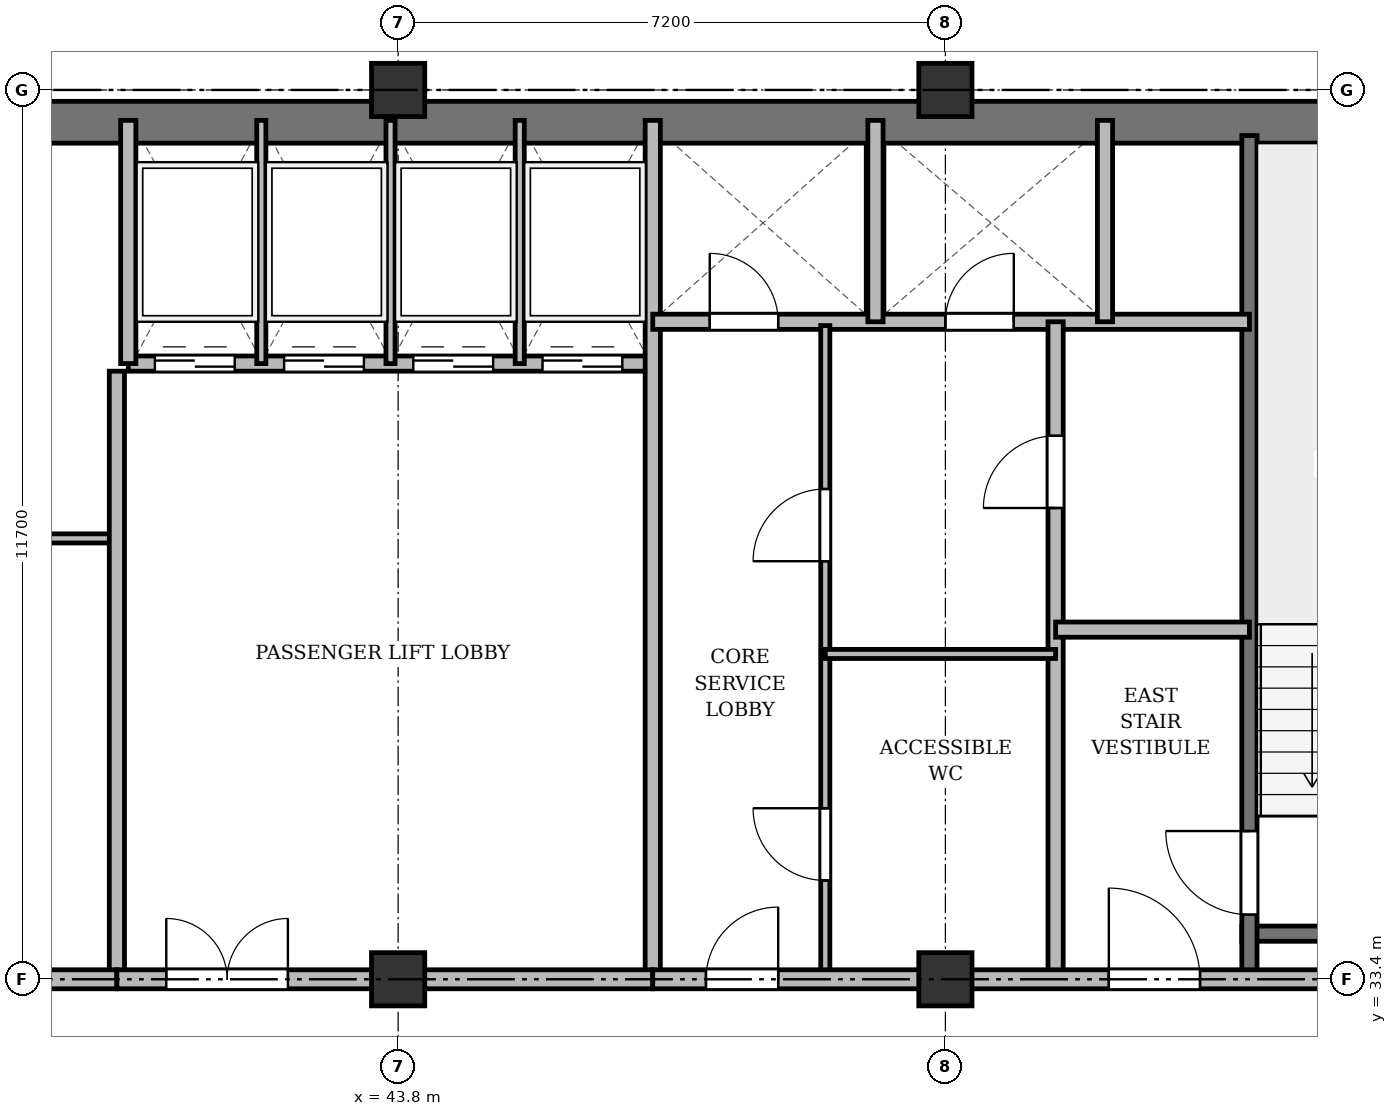
"""IFC4 building model, lengths in metres.
Left out: names, types, materials, properties, quantities, classifications, styles, units other than length and angle.
Written with IfcOpenShell. Run it as: python <this file> out.ifc"""

import sys

from ifc_helpers import new_model, si_unit, direction, frame, frame_2d, origin, origin_2d, place, context, subcontext, project, spatial, rectangle, extrude, source, transform, mapped, element, fill, save


model = new_model("IFC4")
c1 = context("Model", 3, precision=1e-05, world=origin(), true_north=direction((0.0, 1.0)))
c2 = subcontext(c1, "Body", "Model", "MODEL_VIEW")
j1 = project(units=[si_unit("LENGTHUNIT", "METRE"), si_unit("PLANEANGLEUNIT", "RADIAN")], contexts=[c1])
p1 = place(None, origin())
s1 = spatial("IfcSite", under=j1, at=p1, CompositionType="ELEMENT")
p2 = place(p1, origin())
s2 = spatial("IfcBuilding", under=s1, at=p2, CompositionType="ELEMENT")
p3 = place(p2, frame((0.0, 0.0, 230.1)))
s3 = spatial("IfcBuildingStorey", under=s2, at=p3, CompositionType="ELEMENT", Elevation=230.1)
m1 = source(origin(), c2, "Body", "SweptSolid", [
    extrude(rectangle(XDim=0.7, YDim=0.7, at=origin_2d()), origin(), (0.0, 0.0, 1.0), 3.6),
])
for number, where, z_axis, x_axis in (
    (1, (43.8, 33.4, 0.0), (0.0, 0.0, 1.0), (1.0, 0.0, 0.0)),
    (2, (43.8, 45.1, 0.0), (0.0, 0.0, 1.0), (1.0, 0.0, 0.0)),
    (3, (51.0, 33.4, 0.0), (0.0, 0.0, 1.0), (1.0, 0.0, 0.0)),
    (4, (51.0, 45.1, 0.0), (0.0, 0.0, 1.0), (1.0, 0.0, 0.0)),
):
    element("IfcColumn", number, at=place(p3, frame(where, z_axis=z_axis, x_axis=x_axis)), inside=s3, PredefinedType="COLUMN", context=c2, shape_type="MappedRepresentation", body=[
        mapped(m1, transform((0.0, 0.0, 0.0), x_axis=(1.0, 0.0, 0.0), y_axis=(0.0, 1.0, 0.0), z_axis=(0.0, 0.0, 1.0), scale=1.0)),
    ])
p4 = place(p3, frame((15.65, 44.675, 0.0), z_axis=(0.0, 0.0, 1.0), x_axis=(1.0, 0.0, 0.0)))
e5 = element("IfcWall", 5, at=p4, inside=s3, PredefinedType="SHEAR", context=c2, shape_type="SweptSolid", body=[
    extrude(rectangle(XDim=43.1, YDim=0.55, at=frame_2d((21.55, 0.0))), origin(), (0.0, 0.0, 1.0), 3.36),
])
p5 = place(p3, frame((54.9, 34.0, 0.0), z_axis=(0.0, 0.0, 1.0), x_axis=(1.0, 0.0, 0.0)))
e6 = element("IfcWall", 6, at=p5, inside=s3, PredefinedType="SHEAR", context=c2, shape_type="SweptSolid", body=[
    extrude(rectangle(XDim=3.4, YDim=0.2, at=frame_2d((1.7, 0.0))), origin(), (0.0, 0.0, 1.0), 3.36),
])
p6 = place(p3, frame((55.0, 33.4, 0.0), z_axis=(0.0, 0.0, 1.0), x_axis=(0.0, 1.0, 0.0)))
e7 = element("IfcWall", 7, at=p6, inside=s3, PredefinedType="SHEAR", context=c2, shape_type="SweptSolid", body=[
    extrude(rectangle(XDim=11.1, YDim=0.2, at=frame_2d((5.55, 0.0))), origin(), (0.0, 0.0, 1.0), 3.36),
])
p7 = place(p6, frame((0.85, 0.0, 0.0)))
e8 = element("IfcOpeningElement", 8, at=p7, cuts=e7, PredefinedType="OPENING", context=c2, shape_type="SweptSolid", body=[
    extrude(rectangle(XDim=1.1, YDim=2.15, at=frame_2d((0.55, 1.075))), frame((0.0, 0.11, 0.0), z_axis=(0.0, -1.0, 0.0), x_axis=(1.0, 0.0, 0.0)), (0.0, 0.0, 1.0), 0.22),
])
p8 = place(p3, frame((33.3, 39.2, 0.0), z_axis=(0.0, 0.0, 1.0), x_axis=(1.0, 0.0, 0.0)))
e9 = element("IfcWall", 9, at=p8, inside=s3, PredefinedType="PARTITIONING", context=c2, shape_type="SweptSolid", body=[
    extrude(rectangle(XDim=6.8, YDim=0.12, at=frame_2d((3.4, 0.0))), origin(), (0.0, 0.0, 1.0), 3.36),
])
p9 = place(p8, frame((2.6, 0.0, 0.0)))
e10 = element("IfcOpeningElement", 10, at=p9, cuts=e9, PredefinedType="OPENING", context=c2, shape_type="SweptSolid", body=[
    extrude(rectangle(XDim=0.95, YDim=2.15, at=frame_2d((0.475, 1.075))), frame((0.0, 0.07, 0.0), z_axis=(0.0, -1.0, 0.0), x_axis=(1.0, 0.0, 0.0)), (0.0, 0.0, 1.0), 0.14),
])
p10 = place(p3, frame((40.1, 33.4, 0.0), z_axis=(0.0, 0.0, 1.0), x_axis=(0.0, 1.0, 0.0)))
e11 = element("IfcWall", 11, at=p10, inside=s3, PredefinedType="SOLIDWALL", context=c2, shape_type="SweptSolid", body=[
    extrude(rectangle(XDim=8.0, YDim=0.2, at=frame_2d((4.0, 0.0))), origin(), (0.0, 0.0, 1.0), 2.91),
])
p11 = place(p3, frame((40.25, 41.5, 0.0), z_axis=(0.0, 0.0, 1.0), x_axis=(1.0, 0.0, 0.0)))
e12 = element("IfcWall", 12, at=p11, inside=s3, PredefinedType="SOLIDWALL", context=c2, shape_type="SweptSolid", body=[
    extrude(rectangle(XDim=6.9, YDim=0.2, at=frame_2d((3.45, 0.0))), origin(), (0.0, 0.0, 1.0), 3.36),
])
p12 = place(p11, frame((0.35, 0.0, 0.0)))
e13 = element("IfcOpeningElement", 13, at=p12, cuts=e12, PredefinedType="OPENING", context=c2, shape_type="SweptSolid", body=[
    extrude(rectangle(XDim=1.05, YDim=2.15, at=frame_2d((0.525, 1.075))), frame((0.0, 0.11, 0.0), z_axis=(0.0, -1.0, 0.0), x_axis=(1.0, 0.0, 0.0)), (0.0, 0.0, 1.0), 0.22),
])
p13 = place(p11, frame((2.05, 0.0, 0.0)))
e14 = element("IfcOpeningElement", 14, at=p13, cuts=e12, PredefinedType="OPENING", context=c2, shape_type="SweptSolid", body=[
    extrude(rectangle(XDim=1.05, YDim=2.15, at=frame_2d((0.525, 1.075))), frame((0.0, 0.11, 0.0), z_axis=(0.0, -1.0, 0.0), x_axis=(1.0, 0.0, 0.0)), (0.0, 0.0, 1.0), 0.22),
])
p14 = place(p11, frame((3.75, 0.0, 0.0)))
e15 = element("IfcOpeningElement", 15, at=p14, cuts=e12, PredefinedType="OPENING", context=c2, shape_type="SweptSolid", body=[
    extrude(rectangle(XDim=1.05, YDim=2.15, at=frame_2d((0.525, 1.075))), frame((0.0, 0.11, 0.0), z_axis=(0.0, -1.0, 0.0), x_axis=(1.0, 0.0, 0.0)), (0.0, 0.0, 1.0), 0.22),
])
p15 = place(p11, frame((5.45, 0.0, 0.0)))
e16 = element("IfcOpeningElement", 16, at=p15, cuts=e12, PredefinedType="OPENING", context=c2, shape_type="SweptSolid", body=[
    extrude(rectangle(XDim=1.05, YDim=2.15, at=frame_2d((0.525, 1.075))), frame((0.0, 0.11, 0.0), z_axis=(0.0, -1.0, 0.0), x_axis=(1.0, 0.0, 0.0)), (0.0, 0.0, 1.0), 0.22),
])
p16 = place(p3, frame((40.25, 41.5, 0.0), z_axis=(0.0, 0.0, 1.0), x_axis=(0.0, 1.0, 0.0)))
e17 = element("IfcWall", 17, at=p16, inside=s3, PredefinedType="SOLIDWALL", context=c2, shape_type="SweptSolid", body=[
    extrude(rectangle(XDim=3.2, YDim=0.2, at=frame_2d((1.6, 0.0))), origin(), (0.0, 0.0, 1.0), 3.36),
])
for number, where, z_axis, x_axis in (
    (18, (42.0, 41.5, 0.0), (0.0, 0.0, 1.0), (0.0, 1.0, 0.0)),
    (19, (43.7, 41.5, 0.0), (0.0, 0.0, 1.0), (0.0, 1.0, 0.0)),
    (20, (45.4, 41.5, 0.0), (0.0, 0.0, 1.0), (0.0, 1.0, 0.0)),
):
    element("IfcWall", number, at=place(p3, frame(where, z_axis=z_axis, x_axis=x_axis)), inside=s3, PredefinedType="PARTITIONING", context=c2, shape_type="SweptSolid", body=[
        extrude(rectangle(XDim=3.2, YDim=0.12, at=frame_2d((1.6, 0.0))), origin(), (0.0, 0.0, 1.0), 3.36),
    ])
p17 = place(p3, frame((47.15, 33.4, 0.0), z_axis=(0.0, 0.0, 1.0), x_axis=(0.0, 1.0, 0.0)))
e21 = element("IfcWall", 21, at=p17, inside=s3, PredefinedType="SOLIDWALL", context=c2, shape_type="SweptSolid", body=[
    extrude(rectangle(XDim=11.3, YDim=0.2, at=frame_2d((5.65, 0.0))), origin(), (0.0, 0.0, 1.0), 2.91),
])
p18 = place(p3, frame((33.3, 33.4, 0.0), z_axis=(0.0, 0.0, 1.0), x_axis=(1.0, 0.0, 0.0)))
e22 = element("IfcWall", 22, at=p18, inside=s3, PredefinedType="PARTITIONING", context=c2, shape_type="SweptSolid", body=[
    extrude(rectangle(XDim=6.8, YDim=0.25, at=frame_2d((3.4, 0.0))), origin(), (0.0, 0.0, 1.0), 2.91),
])
p19 = place(p18, frame((2.4, 0.0, 0.0)))
e23 = element("IfcOpeningElement", 23, at=p19, cuts=e22, PredefinedType="OPENING", context=c2, shape_type="SweptSolid", body=[
    extrude(rectangle(XDim=1.0, YDim=2.15, at=frame_2d((0.5, 1.075))), frame((0.0, 0.135, 0.0), z_axis=(0.0, -1.0, 0.0), x_axis=(1.0, 0.0, 0.0)), (0.0, 0.0, 1.0), 0.27),
])
p20 = place(p3, frame((40.1, 33.4, 0.0), z_axis=(0.0, 0.0, 1.0), x_axis=(1.0, 0.0, 0.0)))
e24 = element("IfcWall", 24, at=p20, inside=s3, PredefinedType="PARTITIONING", context=c2, shape_type="SweptSolid", body=[
    extrude(rectangle(XDim=7.05, YDim=0.25, at=frame_2d((3.525, 0.0))), origin(), (0.0, 0.0, 1.0), 2.91),
])
p21 = place(p20, frame((0.65, 0.0, 0.0)))
e25 = element("IfcOpeningElement", 25, at=p21, cuts=e24, PredefinedType="OPENING", context=c2, shape_type="SweptSolid", body=[
    extrude(rectangle(XDim=1.6, YDim=2.2, at=frame_2d((0.8, 1.1))), frame((0.0, 0.135, 0.0), z_axis=(0.0, -1.0, 0.0), x_axis=(1.0, 0.0, 0.0)), (0.0, 0.0, 1.0), 0.27),
])
p22 = place(p3, frame((47.15, 42.05, 0.0), z_axis=(0.0, 0.0, 1.0), x_axis=(1.0, 0.0, 0.0)))
e26 = element("IfcWall", 26, at=p22, inside=s3, PredefinedType="SOLIDWALL", context=c2, shape_type="SweptSolid", body=[
    extrude(rectangle(XDim=7.85, YDim=0.2, at=frame_2d((3.925, 0.0))), origin(), (0.0, 0.0, 1.0), 2.86),
])
p23 = place(p22, frame((0.75, 0.0, 0.0)))
e27 = element("IfcOpeningElement", 27, at=p23, cuts=e26, PredefinedType="OPENING", context=c2, shape_type="SweptSolid", body=[
    extrude(rectangle(XDim=0.9, YDim=2.1, at=frame_2d((0.45, 1.05))), frame((0.0, 0.11, 0.0), z_axis=(0.0, -1.0, 0.0), x_axis=(1.0, 0.0, 0.0)), (0.0, 0.0, 1.0), 0.22),
])
p24 = place(p22, frame((3.85, 0.0, 0.0)))
e28 = element("IfcOpeningElement", 28, at=p24, cuts=e26, PredefinedType="OPENING", context=c2, shape_type="SweptSolid", body=[
    extrude(rectangle(XDim=0.9, YDim=2.1, at=frame_2d((0.45, 1.05))), frame((0.0, 0.11, 0.0), z_axis=(0.0, -1.0, 0.0), x_axis=(1.0, 0.0, 0.0)), (0.0, 0.0, 1.0), 0.22),
])
for number, where, z_axis, x_axis in (
    (29, (50.08, 42.05, 0.0), (0.0, 0.0, 1.0), (0.0, 1.0, 0.0)),
    (30, (53.1, 42.05, 0.0), (0.0, 0.0, 1.0), (0.0, 1.0, 0.0)),
):
    element("IfcWall", number, at=place(p3, frame(where, z_axis=z_axis, x_axis=x_axis)), inside=s3, PredefinedType="SOLIDWALL", context=c2, shape_type="SweptSolid", body=[
        extrude(rectangle(XDim=2.65, YDim=0.2, at=frame_2d((1.325, 0.0))), origin(), (0.0, 0.0, 1.0), 3.36),
    ])
p25 = place(p3, frame((52.45, 33.4, 0.0), z_axis=(0.0, 0.0, 1.0), x_axis=(0.0, 1.0, 0.0)))
e31 = element("IfcWall", 31, at=p25, inside=s3, PredefinedType="PARTITIONING", context=c2, shape_type="SweptSolid", body=[
    extrude(rectangle(XDim=8.65, YDim=0.2, at=frame_2d((4.325, 0.0))), origin(), (0.0, 0.0, 1.0), 2.91),
])
p26 = place(p25, frame((6.2, 0.0, 0.0)))
e32 = element("IfcOpeningElement", 32, at=p26, cuts=e31, PredefinedType="OPENING", context=c2, shape_type="SweptSolid", body=[
    extrude(rectangle(XDim=0.95, YDim=2.15, at=frame_2d((0.475, 1.075))), frame((0.0, 0.11, 0.0), z_axis=(0.0, -1.0, 0.0), x_axis=(1.0, 0.0, 0.0)), (0.0, 0.0, 1.0), 0.22),
])
p27 = place(p3, frame((52.45, 38.0, 0.0), z_axis=(0.0, 0.0, 1.0), x_axis=(1.0, 0.0, 0.0)))
e33 = element("IfcWall", 33, at=p27, inside=s3, PredefinedType="PARTITIONING", context=c2, shape_type="SweptSolid", body=[
    extrude(rectangle(XDim=2.55, YDim=0.2, at=frame_2d((1.275, 0.0))), origin(), (0.0, 0.0, 1.0), 3.36),
])
p28 = place(p3, frame((49.42, 33.4, 0.0), z_axis=(0.0, 0.0, 1.0), x_axis=(0.0, 1.0, 0.0)))
e34 = element("IfcWall", 34, at=p28, inside=s3, PredefinedType="PARTITIONING", context=c2, shape_type="SweptSolid", body=[
    extrude(rectangle(XDim=8.6, YDim=0.12, at=frame_2d((4.3, 0.0))), origin(), (0.0, 0.0, 1.0), 2.91),
])
p29 = place(p28, frame((1.3, 0.0, 0.0)))
e35 = element("IfcOpeningElement", 35, at=p29, cuts=e34, PredefinedType="OPENING", context=c2, shape_type="SweptSolid", body=[
    extrude(rectangle(XDim=0.95, YDim=2.15, at=frame_2d((0.475, 1.075))), frame((0.0, 0.07, 0.0), z_axis=(0.0, -1.0, 0.0), x_axis=(1.0, 0.0, 0.0)), (0.0, 0.0, 1.0), 0.14),
])
p30 = place(p28, frame((5.5, 0.0, 0.0)))
e36 = element("IfcOpeningElement", 36, at=p30, cuts=e34, PredefinedType="OPENING", context=c2, shape_type="SweptSolid", body=[
    extrude(rectangle(XDim=0.95, YDim=2.15, at=frame_2d((0.475, 1.075))), frame((0.0, 0.07, 0.0), z_axis=(0.0, -1.0, 0.0), x_axis=(1.0, 0.0, 0.0)), (0.0, 0.0, 1.0), 0.14),
])
p31 = place(p3, frame((49.42, 37.68, 0.0), z_axis=(0.0, 0.0, 1.0), x_axis=(1.0, 0.0, 0.0)))
e37 = element("IfcWall", 37, at=p31, inside=s3, PredefinedType="PARTITIONING", context=c2, shape_type="SweptSolid", body=[
    extrude(rectangle(XDim=3.03, YDim=0.12, at=frame_2d((1.515, 0.0))), origin(), (0.0, 0.0, 1.0), 2.86),
])
p32 = place(p3, frame((47.15, 33.4, 0.0), z_axis=(0.0, 0.0, 1.0), x_axis=(1.0, 0.0, 0.0)))
e38 = element("IfcWall", 38, at=p32, inside=s3, PredefinedType="PARTITIONING", context=c2, shape_type="SweptSolid", body=[
    extrude(rectangle(XDim=11.15, YDim=0.25, at=frame_2d((5.575, 0.0))), origin(), (0.0, 0.0, 1.0), 2.91),
])
p33 = place(p32, frame((0.7, 0.0, 0.0)))
e39 = element("IfcOpeningElement", 39, at=p33, cuts=e38, PredefinedType="OPENING", context=c2, shape_type="SweptSolid", body=[
    extrude(rectangle(XDim=0.95, YDim=2.15, at=frame_2d((0.475, 1.075))), frame((0.0, 0.135, 0.0), z_axis=(0.0, -1.0, 0.0), x_axis=(1.0, 0.0, 0.0)), (0.0, 0.0, 1.0), 0.27),
])
p34 = place(p32, frame((6.0, 0.0, 0.0)))
e40 = element("IfcOpeningElement", 40, at=p34, cuts=e38, PredefinedType="OPENING", context=c2, shape_type="SweptSolid", body=[
    extrude(rectangle(XDim=1.2, YDim=2.15, at=frame_2d((0.6, 1.075))), frame((0.0, 0.135, 0.0), z_axis=(0.0, -1.0, 0.0), x_axis=(1.0, 0.0, 0.0)), (0.0, 0.0, 1.0), 0.27),
])
m2 = source(origin(), c2, "Body", "SweptSolid", [
    extrude(rectangle(XDim=1.1, YDim=2.15, at=frame_2d((0.55, 1.075))), frame((0.0, 0.025, 0.0), z_axis=(0.0, -1.0, 0.0), x_axis=(1.0, 0.0, 0.0)), (0.0, 0.0, 1.0), 0.05),
])
p35 = place(p7, origin())
e41 = element("IfcDoor", 41, at=p35, inside=s3, OperationType="SINGLE_SWING_RIGHT", PredefinedType="DOOR", context=c2, shape_type="MappedRepresentation", body=[
    mapped(m2, transform((0.0, 0.0, 0.0), x_axis=(1.0, 0.0, 0.0), y_axis=(0.0, 1.0, 0.0), z_axis=(0.0, 0.0, 1.0), scale=1.0)),
])
fill(e8, e41)
m3 = source(origin(), c2, "Body", "SweptSolid", [
    extrude(rectangle(XDim=1.05, YDim=2.15, at=frame_2d((0.525, 1.075))), frame((0.0, 0.025, 0.0), z_axis=(0.0, -1.0, 0.0), x_axis=(1.0, 0.0, 0.0)), (0.0, 0.0, 1.0), 0.05),
])
p36 = place(p12, origin())
e42 = element("IfcDoor", 42, at=p36, inside=s3, OperationType="DOUBLE_DOOR_SLIDING", PredefinedType="DOOR", context=c2, shape_type="MappedRepresentation", body=[
    mapped(m3, transform((0.0, 0.0, 0.0), x_axis=(1.0, 0.0, 0.0), y_axis=(0.0, 1.0, 0.0), z_axis=(0.0, 0.0, 1.0), scale=1.0)),
])
fill(e13, e42)
p37 = place(p13, origin())
e43 = element("IfcDoor", 43, at=p37, inside=s3, OperationType="DOUBLE_DOOR_SLIDING", PredefinedType="DOOR", context=c2, shape_type="MappedRepresentation", body=[
    mapped(m3, transform((0.0, 0.0, 0.0), x_axis=(1.0, 0.0, 0.0), y_axis=(0.0, 1.0, 0.0), z_axis=(0.0, 0.0, 1.0), scale=1.0)),
])
fill(e14, e43)
p38 = place(p14, origin())
e44 = element("IfcDoor", 44, at=p38, inside=s3, OperationType="DOUBLE_DOOR_SLIDING", PredefinedType="DOOR", context=c2, shape_type="MappedRepresentation", body=[
    mapped(m3, transform((0.0, 0.0, 0.0), x_axis=(1.0, 0.0, 0.0), y_axis=(0.0, 1.0, 0.0), z_axis=(0.0, 0.0, 1.0), scale=1.0)),
])
fill(e15, e44)
p39 = place(p15, origin())
e45 = element("IfcDoor", 45, at=p39, inside=s3, OperationType="DOUBLE_DOOR_SLIDING", PredefinedType="DOOR", context=c2, shape_type="MappedRepresentation", body=[
    mapped(m3, transform((0.0, 0.0, 0.0), x_axis=(1.0, 0.0, 0.0), y_axis=(0.0, 1.0, 0.0), z_axis=(0.0, 0.0, 1.0), scale=1.0)),
])
fill(e16, e45)
m4 = source(origin(), c2, "Body", "SweptSolid", [
    extrude(rectangle(XDim=1.6, YDim=2.2, at=frame_2d((0.8, 1.1))), frame((0.0, 0.025, 0.0), z_axis=(0.0, -1.0, 0.0), x_axis=(1.0, 0.0, 0.0)), (0.0, 0.0, 1.0), 0.05),
])
p40 = place(p21, origin())
e46 = element("IfcDoor", 46, at=p40, inside=s3, OperationType="DOUBLE_DOOR_SINGLE_SWING", PredefinedType="DOOR", context=c2, shape_type="MappedRepresentation", body=[
    mapped(m4, transform((0.0, 0.0, 0.0), x_axis=(1.0, 0.0, 0.0), y_axis=(0.0, 1.0, 0.0), z_axis=(0.0, 0.0, 1.0), scale=1.0)),
])
fill(e25, e46)
m5 = source(origin(), c2, "Body", "SweptSolid", [
    extrude(rectangle(XDim=0.9, YDim=2.1, at=frame_2d((0.45, 1.05))), frame((0.0, 0.025, 0.0), z_axis=(0.0, -1.0, 0.0), x_axis=(1.0, 0.0, 0.0)), (0.0, 0.0, 1.0), 0.05),
])
p41 = place(p23, origin())
e47 = element("IfcDoor", 47, at=p41, inside=s3, OperationType="SINGLE_SWING_LEFT", PredefinedType="DOOR", context=c2, shape_type="MappedRepresentation", body=[
    mapped(m5, transform((0.0, 0.0, 0.0), x_axis=(1.0, 0.0, 0.0), y_axis=(0.0, 1.0, 0.0), z_axis=(0.0, 0.0, 1.0), scale=1.0)),
])
fill(e27, e47)
p42 = place(p24, origin())
e48 = element("IfcDoor", 48, at=p42, inside=s3, OperationType="SINGLE_SWING_RIGHT", PredefinedType="DOOR", context=c2, shape_type="MappedRepresentation", body=[
    mapped(m5, transform((0.0, 0.0, 0.0), x_axis=(1.0, 0.0, 0.0), y_axis=(0.0, 1.0, 0.0), z_axis=(0.0, 0.0, 1.0), scale=1.0)),
])
fill(e28, e48)
m6 = source(origin(), c2, "Body", "SweptSolid", [
    extrude(rectangle(XDim=0.95, YDim=2.15, at=frame_2d((0.475, 1.075))), frame((0.0, 0.025, 0.0), z_axis=(0.0, -1.0, 0.0), x_axis=(1.0, 0.0, 0.0)), (0.0, 0.0, 1.0), 0.05),
])
p43 = place(p26, origin())
e49 = element("IfcDoor", 49, at=p43, inside=s3, OperationType="SINGLE_SWING_LEFT", PredefinedType="DOOR", context=c2, shape_type="MappedRepresentation", body=[
    mapped(m6, transform((0.0, 0.0, 0.0), x_axis=(1.0, 0.0, 0.0), y_axis=(0.0, 1.0, 0.0), z_axis=(0.0, 0.0, 1.0), scale=1.0)),
])
fill(e32, e49)
p44 = place(p29, origin())
e50 = element("IfcDoor", 50, at=p44, inside=s3, OperationType="SINGLE_SWING_RIGHT", PredefinedType="DOOR", context=c2, shape_type="MappedRepresentation", body=[
    mapped(m6, transform((0.0, 0.0, 0.0), x_axis=(1.0, 0.0, 0.0), y_axis=(0.0, 1.0, 0.0), z_axis=(0.0, 0.0, 1.0), scale=1.0)),
])
fill(e35, e50)
p45 = place(p30, origin())
e51 = element("IfcDoor", 51, at=p45, inside=s3, OperationType="SINGLE_SWING_LEFT", PredefinedType="DOOR", context=c2, shape_type="MappedRepresentation", body=[
    mapped(m6, transform((0.0, 0.0, 0.0), x_axis=(1.0, 0.0, 0.0), y_axis=(0.0, 1.0, 0.0), z_axis=(0.0, 0.0, 1.0), scale=1.0)),
])
fill(e36, e51)
p46 = place(p33, origin())
e52 = element("IfcDoor", 52, at=p46, inside=s3, OperationType="SINGLE_SWING_RIGHT", PredefinedType="DOOR", context=c2, shape_type="MappedRepresentation", body=[
    mapped(m6, transform((0.0, 0.0, 0.0), x_axis=(1.0, 0.0, 0.0), y_axis=(0.0, 1.0, 0.0), z_axis=(0.0, 0.0, 1.0), scale=1.0)),
])
fill(e39, e52)
m7 = source(origin(), c2, "Body", "SweptSolid", [
    extrude(rectangle(XDim=1.2, YDim=2.15, at=frame_2d((0.6, 1.075))), frame((0.0, 0.025, 0.0), z_axis=(0.0, -1.0, 0.0), x_axis=(1.0, 0.0, 0.0)), (0.0, 0.0, 1.0), 0.05),
])
p47 = place(p34, origin())
e53 = element("IfcDoor", 53, at=p47, inside=s3, OperationType="SINGLE_SWING_LEFT", PredefinedType="DOOR", context=c2, shape_type="MappedRepresentation", body=[
    mapped(m7, transform((0.0, 0.0, 0.0), x_axis=(1.0, 0.0, 0.0), y_axis=(0.0, 1.0, 0.0), z_axis=(0.0, 0.0, 1.0), scale=1.0)),
])
fill(e40, e53)
save(model, sys.argv[1])
